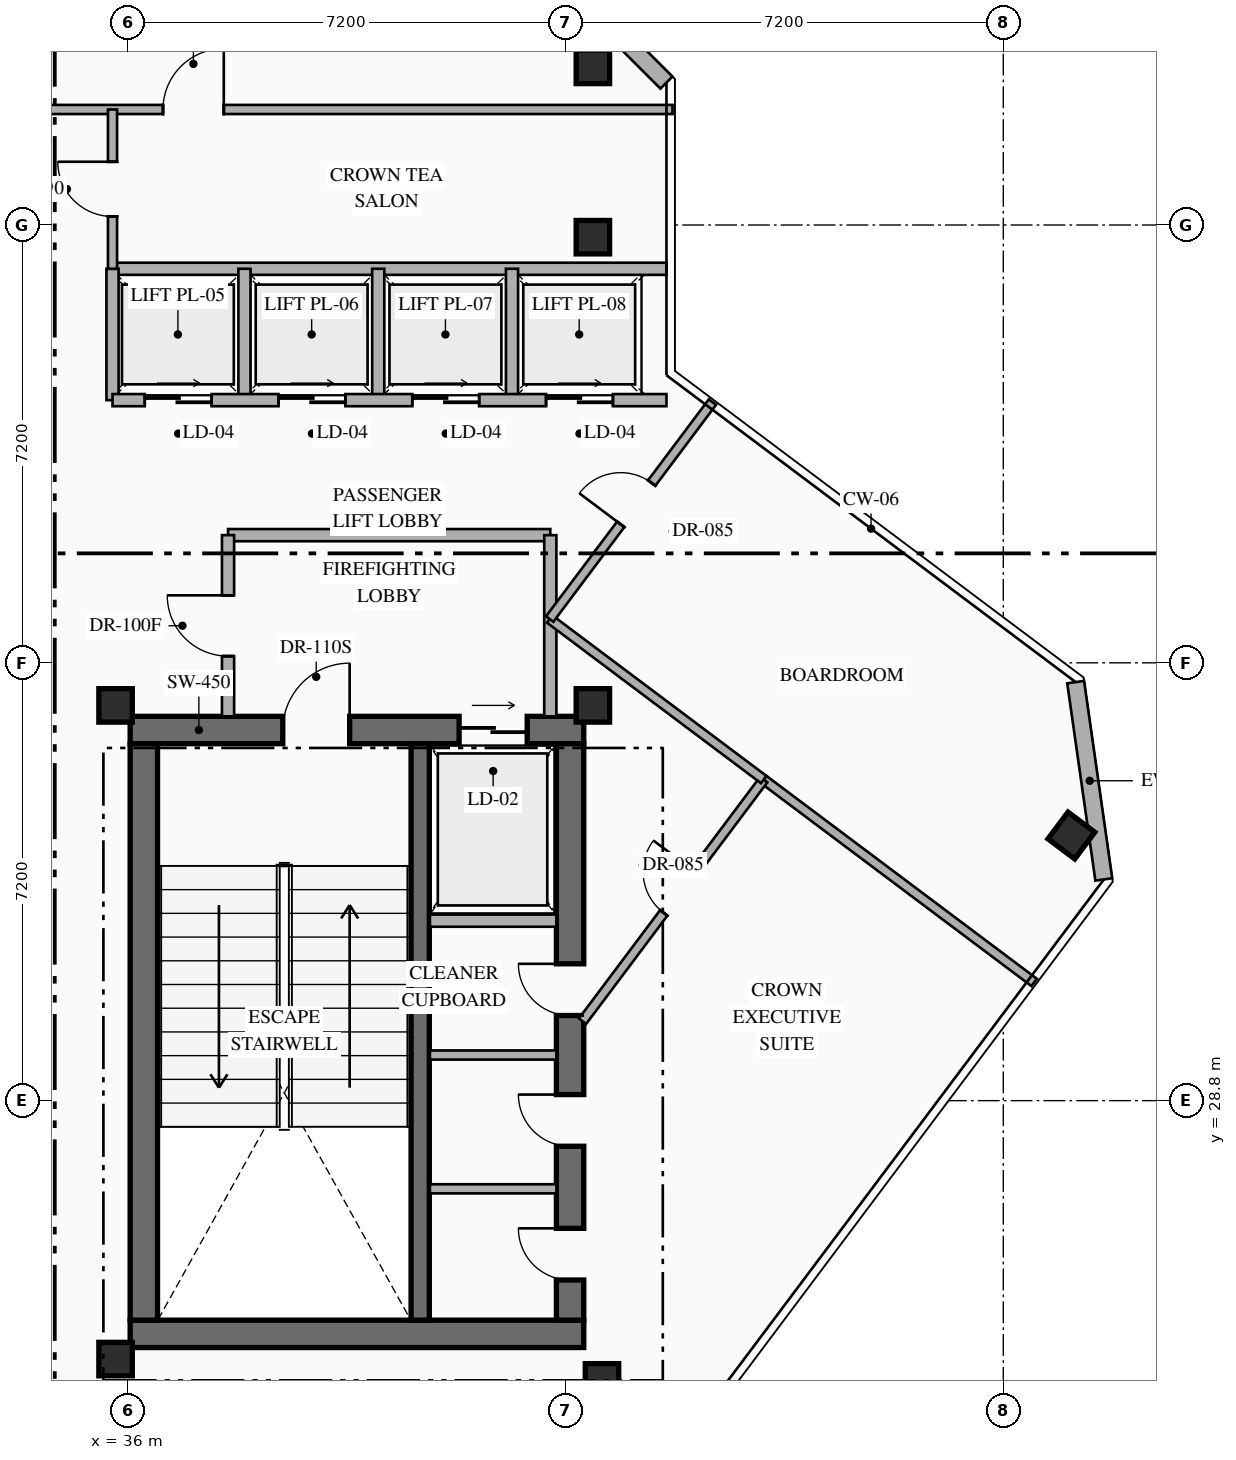
"""IFC4 building model, lengths in metres.
Left out: names, types, materials, properties, quantities, classifications, styles, units other than length and angle.
Written with IfcOpenShell. Run it as: python <this file> out.ifc"""

import sys

from ifc_helpers import new_model, si_unit, direction, frame, frame_2d, origin, origin_2d, place, context, subcontext, project, spatial, rectangle, hollow_rectangle, extrude, element, fill, save


model = new_model("IFC4")
c1 = context("Model", 3, precision=1e-05, world=origin(), true_north=direction((0.0, 1.0)))
c2 = subcontext(c1, "Body", "Model", "MODEL_VIEW")
j1 = project(units=[si_unit("LENGTHUNIT", "METRE"), si_unit("PLANEANGLEUNIT", "RADIAN")], contexts=[c1])
p1 = place(None, origin())
s1 = spatial("IfcSite", under=j1, at=p1, CompositionType="ELEMENT")
p2 = place(p1, origin())
s2 = spatial("IfcBuilding", under=s1, at=p2, CompositionType="ELEMENT")
p3 = place(p2, frame((0.0, 0.0, 285.95)))
s3 = spatial("IfcBuildingStorey", under=s2, at=p3, CompositionType="ELEMENT", Elevation=285.95)
p4 = place(p3, frame((36.04, 24.965, 0.0), z_axis=(0.0, 0.0, 1.0), x_axis=(1.0, 0.0, 0.0)))
e1 = element("IfcWall", 1, at=p4, inside=s3, PredefinedType="SHEAR", context=c2, shape_type="SweptSolid", body=[
    extrude(rectangle(XDim=7.46, YDim=0.45, at=frame_2d((3.73, 0.0))), origin(), (0.0, 0.0, 1.0), 4.0),
])
p5 = place(p3, frame((36.04, 34.895, 0.0), z_axis=(0.0, 0.0, 1.0), x_axis=(1.0, 0.0, 0.0)))
e2 = element("IfcWall", 2, at=p5, inside=s3, PredefinedType="SHEAR", context=c2, shape_type="SweptSolid", body=[
    extrude(rectangle(XDim=7.46, YDim=0.45, at=frame_2d((3.73, 0.0))), origin(), (0.0, 0.0, 1.0), 4.0),
])
p6 = place(p5, frame((2.51, 0.0, 0.0)))
e3 = element("IfcOpeningElement", 3, at=p6, cuts=e2, PredefinedType="OPENING", context=c2, shape_type="SweptSolid", body=[
    extrude(rectangle(XDim=1.1, YDim=2.2, at=frame_2d((0.55, 1.1))), frame((0.0, 0.235, 0.0), z_axis=(0.0, -1.0, 0.0), x_axis=(1.0, 0.0, 0.0)), (0.0, 0.0, 1.0), 0.47),
])
p7 = place(p5, frame((5.41, 0.0, 0.0)))
e4 = element("IfcOpeningElement", 4, at=p7, cuts=e2, PredefinedType="OPENING", context=c2, shape_type="SweptSolid", body=[
    extrude(rectangle(XDim=1.12, YDim=2.15, at=frame_2d((0.56, 1.075))), frame((0.0, 0.235, 0.0), z_axis=(0.0, -1.0, 0.0), x_axis=(1.0, 0.0, 0.0)), (0.0, 0.0, 1.0), 0.47),
])
p8 = place(p3, frame((36.265, 25.19, 0.0), z_axis=(0.0, 0.0, 1.0), x_axis=(0.0, 1.0, 0.0)))
e5 = element("IfcWall", 5, at=p8, inside=s3, PredefinedType="SHEAR", context=c2, shape_type="SweptSolid", body=[
    extrude(rectangle(XDim=9.48, YDim=0.45, at=frame_2d((4.74, 0.0))), origin(), (0.0, 0.0, 1.0), 4.0),
])
p9 = place(p3, frame((43.275, 25.19, 0.0), z_axis=(0.0, 0.0, 1.0), x_axis=(0.0, 1.0, 0.0)))
e6 = element("IfcWall", 6, at=p9, inside=s3, PredefinedType="SHEAR", context=c2, shape_type="SweptSolid", body=[
    extrude(rectangle(XDim=9.48, YDim=0.45, at=frame_2d((4.74, 0.0))), origin(), (0.0, 0.0, 1.0), 4.0),
])
p10 = place(p9, frame((0.66, 0.0, 0.0)))
e7 = element("IfcOpeningElement", 7, at=p10, cuts=e6, PredefinedType="OPENING", context=c2, shape_type="SweptSolid", body=[
    extrude(rectangle(XDim=0.85, YDim=2.08, at=frame_2d((0.425, 1.04))), frame((0.0, 0.235, 0.0), z_axis=(0.0, -1.0, 0.0), x_axis=(1.0, 0.0, 0.0)), (0.0, 0.0, 1.0), 0.47),
])
p11 = place(p9, frame((2.86, 0.0, 0.0)))
e8 = element("IfcOpeningElement", 8, at=p11, cuts=e6, PredefinedType="OPENING", context=c2, shape_type="SweptSolid", body=[
    extrude(rectangle(XDim=0.85, YDim=2.08, at=frame_2d((0.425, 1.04))), frame((0.0, 0.235, 0.0), z_axis=(0.0, -1.0, 0.0), x_axis=(1.0, 0.0, 0.0)), (0.0, 0.0, 1.0), 0.47),
])
p12 = place(p9, frame((5.01, 0.0, 0.0)))
e9 = element("IfcOpeningElement", 9, at=p12, cuts=e6, PredefinedType="OPENING", context=c2, shape_type="SweptSolid", body=[
    extrude(rectangle(XDim=0.85, YDim=2.08, at=frame_2d((0.425, 1.04))), frame((0.0, 0.235, 0.0), z_axis=(0.0, -1.0, 0.0), x_axis=(1.0, 0.0, 0.0)), (0.0, 0.0, 1.0), 0.47),
])
p13 = place(p3, frame((40.81, 25.19, 0.0), z_axis=(0.0, 0.0, 1.0), x_axis=(0.0, 1.0, 0.0)))
e10 = element("IfcWall", 10, at=p13, inside=s3, PredefinedType="SHEAR", context=c2, shape_type="SweptSolid", body=[
    extrude(rectangle(XDim=9.48, YDim=0.3, at=frame_2d((4.74, 0.0))), origin(), (0.0, 0.0, 1.0), 4.0),
])
for number, where, z_axis, x_axis in (
    (11, (35.8, 24.55, 0.0), (0.0, 0.0, 1.0), (1.0, 0.0, 0.0)),
    (12, (43.8, 24.2, 0.0), (0.0, 0.0, 1.0), (1.0, 0.0, 0.0)),
    (13, (35.8, 35.3, 0.0), (0.0, 0.0, 1.0), (1.0, 0.0, 0.0)),
    (14, (43.65, 35.3, 0.0), (0.0, 0.0, 1.0), (1.0, 0.0, 0.0)),
    (15, (43.65, 43.0, 0.0), (0.0, 0.0, 1.0), (1.0, 0.0, 0.0)),
    (16, (43.65, 45.8, 0.0), (0.0, 0.0, 1.0), (1.0, 0.0, 0.0)),
    (17, (51.52, 33.16, 0.0), (0.0, 0.0, 1.0), (0.8, -0.6, 0.0)),
):
    element("IfcColumn", number, at=place(p3, frame(where, z_axis=z_axis, x_axis=x_axis)), inside=s3, PredefinedType="COLUMN", context=c2, shape_type="SweptSolid", body=[
        extrude(hollow_rectangle(XDim=0.55, YDim=0.55, WallThickness=0.022, at=origin_2d()), origin(), (0.0, 0.0, 1.0), 4.0),
    ])
p14 = place(p3, frame((51.59, 35.683, 0.0), z_axis=(0.0, 0.0, 1.0), x_axis=(0.141212810973, -0.989979263428, 0.0)))
e18 = element("IfcWall", 18, at=p14, inside=s3, PredefinedType="STANDARD", context=c2, shape_type="SweptSolid", body=[
    extrude(rectangle(XDim=3.278, YDim=0.28, at=frame_2d((1.639, 0.0))), origin(), (0.0, 0.0, 1.0), 3.7),
])
p15 = place(p3, frame((42.542, 47.86, 0.0), z_axis=(0.0, 0.0, 1.0), x_axis=(0.707106781187, -0.707106781187, 0.0)))
e19 = element("IfcWall", 19, at=p15, inside=s3, PredefinedType="STANDARD", context=c2, shape_type="SweptSolid", body=[
    extrude(rectangle(XDim=3.278, YDim=0.28, at=frame_2d((1.639, 0.0))), origin(), (0.0, 0.0, 1.0), 3.7),
])
p16 = place(p3, frame((40.97, 31.76, 0.0), z_axis=(0.0, 0.0, 1.0), x_axis=(1.0, 0.0, 0.0)))
e20 = element("IfcWall", 20, at=p16, inside=s3, PredefinedType="STANDARD", context=c2, shape_type="SweptSolid", body=[
    extrude(rectangle(XDim=2.08, YDim=0.2, at=frame_2d((1.04, 0.0))), origin(), (0.0, 0.0, 1.0), 3.7),
])
for number, where, z_axis, x_axis in (
    (21, (40.97, 27.35, 0.0), (0.0, 0.0, 1.0), (1.0, 0.0, 0.0)),
    (22, (40.97, 29.55, 0.0), (0.0, 0.0, 1.0), (1.0, 0.0, 0.0)),
):
    element("IfcWall", number, at=place(p3, frame(where, z_axis=z_axis, x_axis=x_axis)), inside=s3, PredefinedType="PARTITIONING", context=c2, shape_type="SweptSolid", body=[
        extrude(rectangle(XDim=2.08, YDim=0.15, at=frame_2d((1.04, 0.0))), origin(), (0.0, 0.0, 1.0), 3.7),
    ])
p17 = place(p3, frame((37.65, 38.1, 0.0), z_axis=(0.0, 0.0, 1.0), x_axis=(1.0, 0.0, 0.0)))
e23 = element("IfcWall", 23, at=p17, inside=s3, PredefinedType="STANDARD", context=c2, shape_type="SweptSolid", body=[
    extrude(rectangle(XDim=5.3, YDim=0.2, at=frame_2d((2.65, 0.0))), origin(), (0.0, 0.0, 1.0), 3.7),
])
p18 = place(p3, frame((42.95, 35.12, 0.0), z_axis=(0.0, 0.0, 1.0), x_axis=(0.0, 1.0, 0.0)))
e24 = element("IfcWall", 24, at=p18, inside=s3, PredefinedType="STANDARD", context=c2, shape_type="SweptSolid", body=[
    extrude(rectangle(XDim=2.98, YDim=0.2, at=frame_2d((1.49, 0.0))), origin(), (0.0, 0.0, 1.0), 3.7),
])
p19 = place(p3, frame((37.65, 35.12, 0.0), z_axis=(0.0, 0.0, 1.0), x_axis=(0.0, 1.0, 0.0)))
e25 = element("IfcWall", 25, at=p19, inside=s3, PredefinedType="STANDARD", context=c2, shape_type="SweptSolid", body=[
    extrude(rectangle(XDim=2.98, YDim=0.2, at=frame_2d((1.49, 0.0))), origin(), (0.0, 0.0, 1.0), 3.7),
])
p20 = place(p19, frame((0.99, 0.0, 0.0)))
e26 = element("IfcOpeningElement", 26, at=p20, cuts=e25, PredefinedType="OPENING", context=c2, shape_type="SweptSolid", body=[
    extrude(rectangle(XDim=1.0, YDim=2.2, at=frame_2d((0.5, 1.1))), frame((0.0, 0.11, 0.0), z_axis=(0.0, -1.0, 0.0), x_axis=(1.0, 0.0, 0.0)), (0.0, 0.0, 1.0), 0.22),
])
p21 = place(p3, frame((35.75, 42.48, 0.0), z_axis=(0.0, 0.0, 1.0), x_axis=(1.0, 0.0, 0.0)))
e27 = element("IfcWall", 27, at=p21, inside=s3, PredefinedType="STANDARD", context=c2, shape_type="SweptSolid", body=[
    extrude(rectangle(XDim=9.11, YDim=0.2, at=frame_2d((4.555, 0.0))), origin(), (0.0, 0.0, 1.0), 3.7),
])
for number, where, z_axis, x_axis in (
    (28, (35.75, 40.32, 0.0), (0.0, 0.0, 1.0), (0.0, 1.0, 0.0)),
    (29, (37.92, 40.32, 0.0), (0.0, 0.0, 1.0), (0.0, 1.0, 0.0)),
    (30, (40.12, 40.32, 0.0), (0.0, 0.0, 1.0), (0.0, 1.0, 0.0)),
    (31, (42.32, 40.32, 0.0), (0.0, 0.0, 1.0), (0.0, 1.0, 0.0)),
):
    element("IfcWall", number, at=place(p3, frame(where, z_axis=z_axis, x_axis=x_axis)), inside=s3, PredefinedType="STANDARD", context=c2, shape_type="SweptSolid", body=[
        extrude(rectangle(XDim=2.16, YDim=0.2, at=frame_2d((1.08, 0.0))), origin(), (0.0, 0.0, 1.0), 3.7),
    ])
p22 = place(p3, frame((35.75, 40.32, 0.0), z_axis=(0.0, 0.0, 1.0), x_axis=(1.0, 0.0, 0.0)))
e32 = element("IfcWall", 32, at=p22, inside=s3, PredefinedType="STANDARD", context=c2, shape_type="SweptSolid", body=[
    extrude(rectangle(XDim=9.11, YDim=0.2, at=frame_2d((4.555, 0.0))), origin(), (0.0, 0.0, 1.0), 3.7),
])
p23 = place(p22, frame((0.53, 0.0, 0.0)))
e33 = element("IfcOpeningElement", 33, at=p23, cuts=e32, PredefinedType="OPENING", context=c2, shape_type="SweptSolid", body=[
    extrude(rectangle(XDim=1.1, YDim=2.18, at=frame_2d((0.55, 1.09))), frame((0.0, 0.11, 0.0), z_axis=(0.0, -1.0, 0.0), x_axis=(1.0, 0.0, 0.0)), (0.0, 0.0, 1.0), 0.22),
])
p24 = place(p22, frame((2.73, 0.0, 0.0)))
e34 = element("IfcOpeningElement", 34, at=p24, cuts=e32, PredefinedType="OPENING", context=c2, shape_type="SweptSolid", body=[
    extrude(rectangle(XDim=1.1, YDim=2.18, at=frame_2d((0.55, 1.09))), frame((0.0, 0.11, 0.0), z_axis=(0.0, -1.0, 0.0), x_axis=(1.0, 0.0, 0.0)), (0.0, 0.0, 1.0), 0.22),
])
p25 = place(p22, frame((4.93, 0.0, 0.0)))
e35 = element("IfcOpeningElement", 35, at=p25, cuts=e32, PredefinedType="OPENING", context=c2, shape_type="SweptSolid", body=[
    extrude(rectangle(XDim=1.1, YDim=2.18, at=frame_2d((0.55, 1.09))), frame((0.0, 0.11, 0.0), z_axis=(0.0, -1.0, 0.0), x_axis=(1.0, 0.0, 0.0)), (0.0, 0.0, 1.0), 0.22),
])
p26 = place(p22, frame((7.13, 0.0, 0.0)))
e36 = element("IfcOpeningElement", 36, at=p26, cuts=e32, PredefinedType="OPENING", context=c2, shape_type="SweptSolid", body=[
    extrude(rectangle(XDim=1.1, YDim=2.18, at=frame_2d((0.55, 1.09))), frame((0.0, 0.11, 0.0), z_axis=(0.0, -1.0, 0.0), x_axis=(1.0, 0.0, 0.0)), (0.0, 0.0, 1.0), 0.22),
])
p27 = place(p3, frame((23.2, 45.1, 0.0), z_axis=(0.0, 0.0, 1.0), x_axis=(1.0, 0.0, 0.0)))
e37 = element("IfcWall", 37, at=p27, inside=s3, PredefinedType="PARTITIONING", context=c2, shape_type="SweptSolid", body=[
    extrude(rectangle(XDim=21.76, YDim=0.15, at=frame_2d((10.88, 0.0))), origin(), (0.0, 0.0, 1.0), 3.7),
])
p28 = place(p27, frame((13.38, 0.0, 0.0)))
e38 = element("IfcOpeningElement", 38, at=p28, cuts=e37, PredefinedType="OPENING", context=c2, shape_type="SweptSolid", body=[
    extrude(rectangle(XDim=1.0, YDim=2.15, at=frame_2d((0.5, 1.075))), frame((0.0, 0.085, 0.0), z_axis=(0.0, -1.0, 0.0), x_axis=(1.0, 0.0, 0.0)), (0.0, 0.0, 1.0), 0.17),
])
p29 = place(p3, frame((35.75, 42.48, 0.0), z_axis=(0.0, 0.0, 1.0), x_axis=(0.0, 1.0, 0.0)))
e39 = element("IfcWall", 39, at=p29, inside=s3, PredefinedType="PARTITIONING", context=c2, shape_type="SweptSolid", body=[
    extrude(rectangle(XDim=2.62, YDim=0.15, at=frame_2d((1.31, 0.0))), origin(), (0.0, 0.0, 1.0), 3.7),
])
p30 = place(p29, frame((0.86, 0.0, 0.0)))
e40 = element("IfcOpeningElement", 40, at=p30, cuts=e39, PredefinedType="OPENING", context=c2, shape_type="SweptSolid", body=[
    extrude(rectangle(XDim=0.9, YDim=2.15, at=frame_2d((0.45, 1.075))), frame((0.0, 0.085, 0.0), z_axis=(0.0, -1.0, 0.0), x_axis=(1.0, 0.0, 0.0)), (0.0, 0.0, 1.0), 0.17),
])
p31 = place(p3, frame((28.18, 27.04, 0.0), z_axis=(0.0, 0.0, 1.0), x_axis=(0.80000367127, -0.599995104942, 0.0)))
e41 = element("IfcWall", 41, at=p31, inside=s3, PredefinedType="PARTITIONING", context=c2, shape_type="SweptSolid", body=[
    extrude(rectangle(XDim=15.96, YDim=0.15, at=frame_2d((7.98, 0.0))), origin(), (0.0, 0.0, 1.0), 3.7),
])
p32 = place(p31, frame((10.39, 0.0, 0.0)))
e42 = element("IfcOpeningElement", 42, at=p32, cuts=e41, PredefinedType="OPENING", context=c2, shape_type="SweptSolid", body=[
    extrude(rectangle(XDim=0.9, YDim=2.15, at=frame_2d((0.45, 1.075))), frame((0.0, 0.085, 0.0), z_axis=(0.0, -1.0, 0.0), x_axis=(1.0, 0.0, 0.0)), (0.0, 0.0, 1.0), 0.17),
])
p33 = place(p3, frame((46.46, 34.08, 0.0), z_axis=(0.0, 0.0, 1.0), x_axis=(0.799984192361, -0.600021076273, 0.0)))
e43 = element("IfcWall", 43, at=p33, inside=s3, PredefinedType="PARTITIONING", context=c2, shape_type="SweptSolid", body=[
    extrude(rectangle(XDim=5.56, YDim=0.15, at=frame_2d((2.78, 0.0))), origin(), (0.0, 0.0, 1.0), 3.7),
])
p34 = place(p3, frame((43.48, 30.107, 0.0), z_axis=(0.0, 0.0, 1.0), x_axis=(0.600015730265, 0.799988202059, 0.0)))
e44 = element("IfcWall", 44, at=p34, inside=s3, PredefinedType="PARTITIONING", context=c2, shape_type="SweptSolid", body=[
    extrude(rectangle(XDim=4.967, YDim=0.15, at=frame_2d((2.483, 0.0))), origin(), (0.0, 0.0, 1.0), 3.7),
])
p35 = place(p34, frame((2.226, 0.0, 0.0)))
e45 = element("IfcOpeningElement", 45, at=p35, cuts=e44, PredefinedType="OPENING", context=c2, shape_type="SweptSolid", body=[
    extrude(rectangle(XDim=0.85, YDim=2.08, at=frame_2d((0.425, 1.04))), frame((0.0, 0.085, 0.0), z_axis=(0.0, -1.0, 0.0), x_axis=(1.0, 0.0, 0.0)), (0.0, 0.0, 1.0), 0.17),
])
p36 = place(p3, frame((42.94, 36.72, 0.0), z_axis=(0.0, 0.0, 1.0), x_axis=(0.800013316712, -0.599982243973, 0.0)))
e46 = element("IfcWall", 46, at=p36, inside=s3, PredefinedType="PARTITIONING", context=c2, shape_type="SweptSolid", body=[
    extrude(rectangle(XDim=4.4, YDim=0.15, at=frame_2d((2.2, 0.0))), origin(), (0.0, 0.0, 1.0), 3.245),
])
p37 = place(p3, frame((42.94, 36.72, 0.0), z_axis=(0.0, 0.0, 1.0), x_axis=(0.599991241767, 0.8000065686, 0.0)))
e47 = element("IfcWall", 47, at=p37, inside=s3, PredefinedType="PARTITIONING", context=c2, shape_type="SweptSolid", body=[
    extrude(rectangle(XDim=4.46, YDim=0.15, at=frame_2d((2.23, 0.0))), origin(), (0.0, 0.0, 1.0), 3.7),
])
p38 = place(p37, frame((1.947, 0.0, 0.0)))
e48 = element("IfcOpeningElement", 48, at=p38, cuts=e47, PredefinedType="OPENING", context=c2, shape_type="SweptSolid", body=[
    extrude(rectangle(XDim=0.85, YDim=2.08, at=frame_2d((0.425, 1.04))), frame((0.0, 0.085, 0.0), z_axis=(0.0, -1.0, 0.0), x_axis=(1.0, 0.0, 0.0)), (0.0, 0.0, 1.0), 0.17),
])
p39 = place(p6, origin())
e49 = element("IfcDoor", 49, at=p39, inside=s3, OperationType="SINGLE_SWING_RIGHT", PredefinedType="DOOR", context=c2, shape_type="SweptSolid", body=[
    extrude(rectangle(XDim=1.1, YDim=2.2, at=frame_2d((0.55, 1.1))), frame((0.0, 0.025, 0.0), z_axis=(0.0, -1.0, 0.0), x_axis=(1.0, 0.0, 0.0)), (0.0, 0.0, 1.0), 0.05),
])
fill(e3, e49)
p40 = place(p7, origin())
e50 = element("IfcDoor", 50, at=p40, inside=s3, OperationType="SLIDING_TO_RIGHT", PredefinedType="USERDEFINED", context=c2, shape_type="SweptSolid", body=[
    extrude(rectangle(XDim=1.12, YDim=2.15, at=frame_2d((0.56, 1.075))), frame((0.0, 0.025, 0.0), z_axis=(0.0, -1.0, 0.0), x_axis=(1.0, 0.0, 0.0)), (0.0, 0.0, 1.0), 0.05),
])
fill(e4, e50)
p41 = place(p10, origin())
e51 = element("IfcDoor", 51, at=p41, inside=s3, OperationType="SINGLE_SWING_RIGHT", PredefinedType="DOOR", context=c2, shape_type="SweptSolid", body=[
    extrude(rectangle(XDim=0.85, YDim=2.08, at=frame_2d((0.425, 1.04))), frame((0.0, 0.025, 0.0), z_axis=(0.0, -1.0, 0.0), x_axis=(1.0, 0.0, 0.0)), (0.0, 0.0, 1.0), 0.05),
])
fill(e7, e51)
p42 = place(p11, origin())
e52 = element("IfcDoor", 52, at=p42, inside=s3, OperationType="SINGLE_SWING_RIGHT", PredefinedType="DOOR", context=c2, shape_type="SweptSolid", body=[
    extrude(rectangle(XDim=0.85, YDim=2.08, at=frame_2d((0.425, 1.04))), frame((0.0, 0.025, 0.0), z_axis=(0.0, -1.0, 0.0), x_axis=(1.0, 0.0, 0.0)), (0.0, 0.0, 1.0), 0.05),
])
fill(e8, e52)
p43 = place(p12, origin())
e53 = element("IfcDoor", 53, at=p43, inside=s3, OperationType="SINGLE_SWING_RIGHT", PredefinedType="DOOR", context=c2, shape_type="SweptSolid", body=[
    extrude(rectangle(XDim=0.85, YDim=2.08, at=frame_2d((0.425, 1.04))), frame((0.0, 0.025, 0.0), z_axis=(0.0, -1.0, 0.0), x_axis=(1.0, 0.0, 0.0)), (0.0, 0.0, 1.0), 0.05),
])
fill(e9, e53)
p44 = place(p20, origin())
e54 = element("IfcDoor", 54, at=p44, inside=s3, OperationType="SINGLE_SWING_RIGHT", PredefinedType="DOOR", context=c2, shape_type="SweptSolid", body=[
    extrude(rectangle(XDim=1.0, YDim=2.2, at=frame_2d((0.5, 1.1))), frame((0.0, 0.025, 0.0), z_axis=(0.0, -1.0, 0.0), x_axis=(1.0, 0.0, 0.0)), (0.0, 0.0, 1.0), 0.05),
])
fill(e26, e54)
p45 = place(p23, origin())
e55 = element("IfcDoor", 55, at=p45, inside=s3, OperationType="SLIDING_TO_RIGHT", PredefinedType="USERDEFINED", context=c2, shape_type="SweptSolid", body=[
    extrude(rectangle(XDim=1.1, YDim=2.18, at=frame_2d((0.55, 1.09))), frame((0.0, 0.025, 0.0), z_axis=(0.0, -1.0, 0.0), x_axis=(1.0, 0.0, 0.0)), (0.0, 0.0, 1.0), 0.05),
])
fill(e33, e55)
p46 = place(p24, origin())
e56 = element("IfcDoor", 56, at=p46, inside=s3, OperationType="SLIDING_TO_RIGHT", PredefinedType="USERDEFINED", context=c2, shape_type="SweptSolid", body=[
    extrude(rectangle(XDim=1.1, YDim=2.18, at=frame_2d((0.55, 1.09))), frame((0.0, 0.025, 0.0), z_axis=(0.0, -1.0, 0.0), x_axis=(1.0, 0.0, 0.0)), (0.0, 0.0, 1.0), 0.05),
])
fill(e34, e56)
p47 = place(p25, origin())
e57 = element("IfcDoor", 57, at=p47, inside=s3, OperationType="SLIDING_TO_RIGHT", PredefinedType="USERDEFINED", context=c2, shape_type="SweptSolid", body=[
    extrude(rectangle(XDim=1.1, YDim=2.18, at=frame_2d((0.55, 1.09))), frame((0.0, 0.025, 0.0), z_axis=(0.0, -1.0, 0.0), x_axis=(1.0, 0.0, 0.0)), (0.0, 0.0, 1.0), 0.05),
])
fill(e35, e57)
p48 = place(p26, origin())
e58 = element("IfcDoor", 58, at=p48, inside=s3, OperationType="SLIDING_TO_RIGHT", PredefinedType="USERDEFINED", context=c2, shape_type="SweptSolid", body=[
    extrude(rectangle(XDim=1.1, YDim=2.18, at=frame_2d((0.55, 1.09))), frame((0.0, 0.025, 0.0), z_axis=(0.0, -1.0, 0.0), x_axis=(1.0, 0.0, 0.0)), (0.0, 0.0, 1.0), 0.05),
])
fill(e36, e58)
p49 = place(p28, origin())
e59 = element("IfcDoor", 59, at=p49, inside=s3, OperationType="SINGLE_SWING_RIGHT", PredefinedType="DOOR", context=c2, shape_type="SweptSolid", body=[
    extrude(rectangle(XDim=1.0, YDim=2.15, at=frame_2d((0.5, 1.075))), frame((0.0, 0.025, 0.0), z_axis=(0.0, -1.0, 0.0), x_axis=(1.0, 0.0, 0.0)), (0.0, 0.0, 1.0), 0.05),
])
fill(e38, e59)
p50 = place(p30, origin())
e60 = element("IfcDoor", 60, at=p50, inside=s3, OperationType="SINGLE_SWING_RIGHT", PredefinedType="DOOR", context=c2, shape_type="SweptSolid", body=[
    extrude(rectangle(XDim=0.9, YDim=2.15, at=frame_2d((0.45, 1.075))), frame((0.0, 0.025, 0.0), z_axis=(0.0, -1.0, 0.0), x_axis=(1.0, 0.0, 0.0)), (0.0, 0.0, 1.0), 0.05),
])
fill(e40, e60)
p51 = place(p35, origin())
e61 = element("IfcDoor", 61, at=p51, inside=s3, OperationType="SINGLE_SWING_RIGHT", PredefinedType="DOOR", context=c2, shape_type="SweptSolid", body=[
    extrude(rectangle(XDim=0.85, YDim=2.08, at=frame_2d((0.425, 1.04))), frame((0.0, 0.025, 0.0), z_axis=(0.0, -1.0, 0.0), x_axis=(1.0, 0.0, 0.0)), (0.0, 0.0, 1.0), 0.05),
])
fill(e45, e61)
p52 = place(p38, origin())
e62 = element("IfcDoor", 62, at=p52, inside=s3, OperationType="SINGLE_SWING_LEFT", PredefinedType="DOOR", context=c2, shape_type="SweptSolid", body=[
    extrude(rectangle(XDim=0.85, YDim=2.08, at=frame_2d((0.425, 1.04))), frame((0.0, 0.025, 0.0), z_axis=(0.0, -1.0, 0.0), x_axis=(1.0, 0.0, 0.0)), (0.0, 0.0, 1.0), 0.05),
])
fill(e48, e62)
save(model, sys.argv[1])
